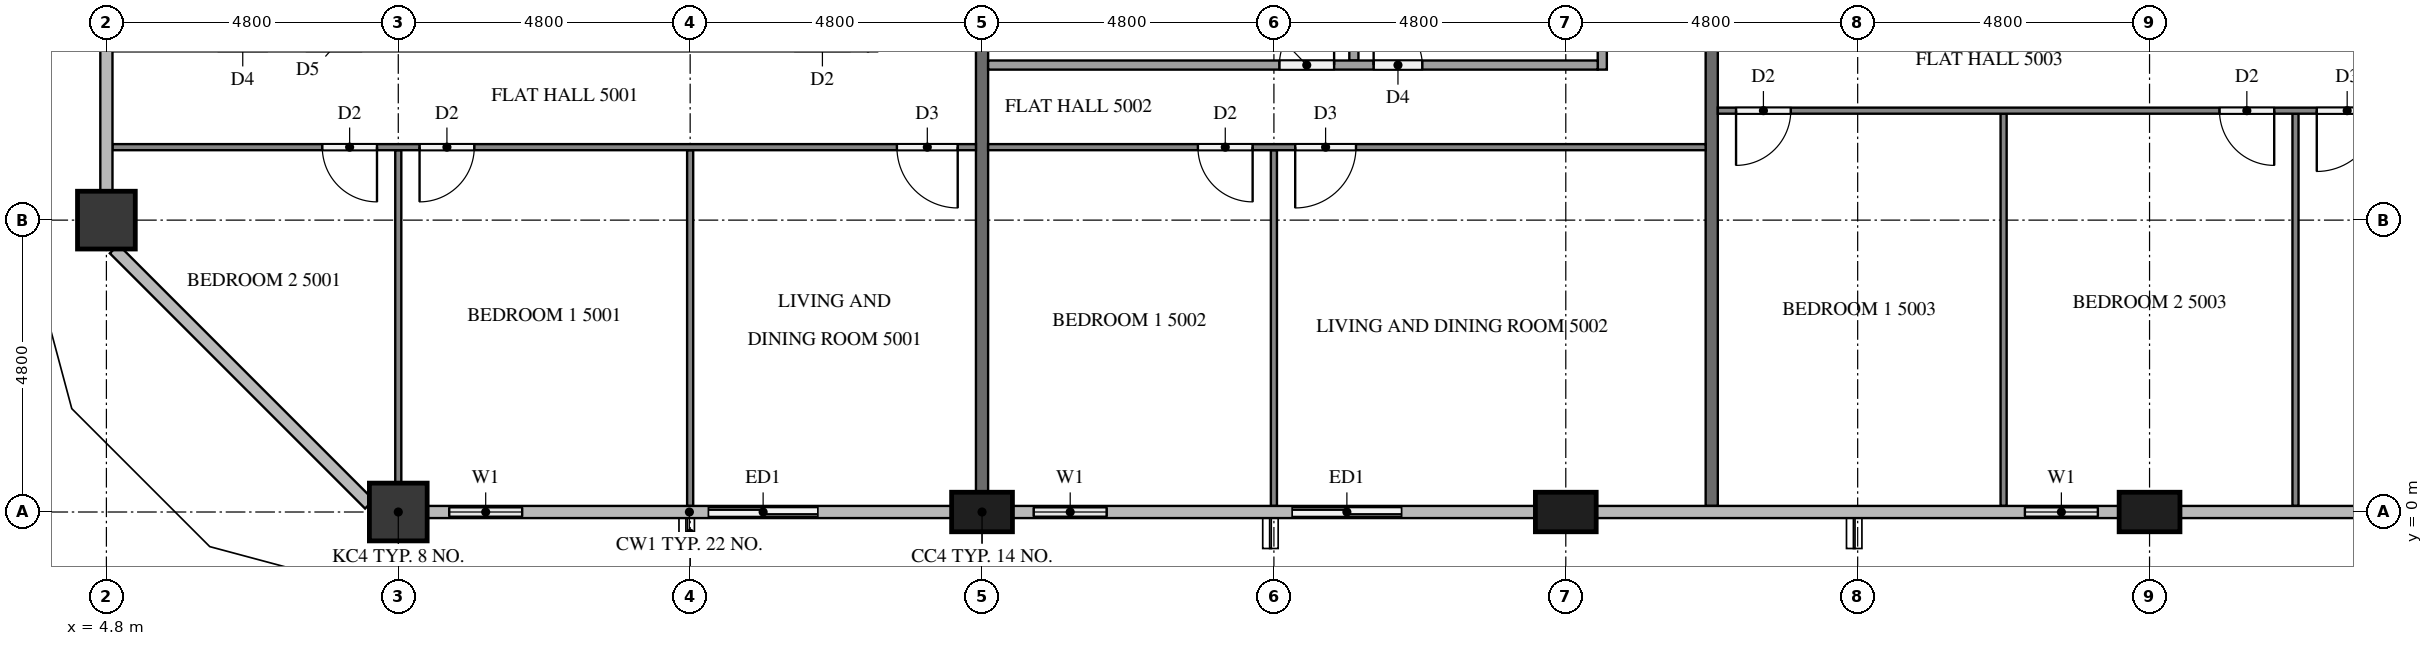
"""IFC4 building model, lengths in metres.
Left out: names, types, materials, properties, quantities, classifications, styles, units other than length and angle.
Written with IfcOpenShell. Run it as: python <this file> out.ifc"""

import sys

from ifc_helpers import new_model, si_unit, direction, frame, frame_2d, origin, origin_2d, place, context, subcontext, project, spatial, rectangle, extrude, element, fill, save


model = new_model("IFC4")
c1 = context("Model", 3, precision=1e-05, world=origin(), true_north=direction((0.0, 1.0)))
c2 = subcontext(c1, "Body", "Model", "MODEL_VIEW")
j1 = project(units=[si_unit("LENGTHUNIT", "METRE"), si_unit("PLANEANGLEUNIT", "RADIAN")], contexts=[c1])
p1 = place(None, origin())
s1 = spatial("IfcSite", under=j1, at=p1, CompositionType="ELEMENT")
p2 = place(p1, origin())
s2 = spatial("IfcBuilding", under=s1, at=p2, CompositionType="ELEMENT")
p3 = place(p2, frame((0.0, 0.0, 192.9)))
s3 = spatial("IfcBuildingStorey", under=s2, at=p3, CompositionType="ELEMENT", Elevation=192.9)
p4 = place(p3, frame((9.6, 0.0, 0.0), z_axis=(0.0, 0.0, 1.0), x_axis=(1.0, 0.0, 0.0)))
e1 = element("IfcColumn", 1, at=p4, inside=s3, PredefinedType="COLUMN", context=c2, shape_type="SweptSolid", body=[
    extrude(rectangle(XDim=0.95, YDim=0.95, at=origin_2d()), origin(), (0.0, 0.0, 1.0), 3.2),
])
for number, where, z_axis, x_axis in (
    (2, (19.2, 0.0, 0.0), (0.0, 0.0, 1.0), (1.0, 0.0, 0.0)),
    (3, (28.8, 0.0, 0.0), (0.0, 0.0, 1.0), (1.0, 0.0, 0.0)),
    (4, (38.4, 0.0, 0.0), (0.0, 0.0, 1.0), (1.0, 0.0, 0.0)),
):
    element("IfcColumn", number, at=place(p3, frame(where, z_axis=z_axis, x_axis=x_axis)), inside=s3, PredefinedType="COLUMN", context=c2, shape_type="SweptSolid", body=[
        extrude(rectangle(XDim=1.0, YDim=0.65, at=origin_2d()), origin(), (0.0, 0.0, 1.0), 3.2),
    ])
p5 = place(p3, frame((4.8, 4.8, 0.0), z_axis=(0.0, 0.0, 1.0), x_axis=(1.0, 0.0, 0.0)))
e5 = element("IfcColumn", 5, at=p5, inside=s3, PredefinedType="COLUMN", context=c2, shape_type="SweptSolid", body=[
    extrude(rectangle(XDim=0.95, YDim=0.95, at=origin_2d()), origin(), (0.0, 0.0, 1.0), 3.2),
])
p6 = place(p3, frame((10.075, 0.0, 0.0), z_axis=(0.0, 0.0, 1.0), x_axis=(1.0, 0.0, 0.0)))
e6 = element("IfcWall", 6, at=p6, inside=s3, PredefinedType="SOLIDWALL", context=c2, shape_type="SweptSolid", body=[
    extrude(rectangle(XDim=1.925, YDim=0.15, at=frame_2d((0.962, 0.0))), origin(), (0.0, 0.0, 1.0), 3.2),
])
p7 = place(p6, frame((0.363, 0.0, 0.9)))
e7 = element("IfcOpeningElement", 7, at=p7, cuts=e6, PredefinedType="OPENING", context=c2, shape_type="SweptSolid", body=[
    extrude(rectangle(XDim=1.2, YDim=1.4, at=frame_2d((0.6, 0.7))), frame((0.0, 0.085, 0.0), z_axis=(0.0, -1.0, 0.0), x_axis=(1.0, 0.0, 0.0)), (0.0, 0.0, 1.0), 0.17),
])
p8 = place(p3, frame((14.4, 0.0, 0.0), z_axis=(0.0, 0.0, 1.0), x_axis=(1.0, 0.0, 0.0)))
e8 = element("IfcWall", 8, at=p8, inside=s3, PredefinedType="SOLIDWALL", context=c2, shape_type="SweptSolid", body=[
    extrude(rectangle(XDim=2.4, YDim=0.15, at=frame_2d((1.2, 0.0))), origin(), (0.0, 0.0, 1.0), 3.2),
])
p9 = place(p8, frame((0.3, 0.0, 0.0)))
e9 = element("IfcOpeningElement", 9, at=p9, cuts=e8, PredefinedType="OPENING", context=c2, shape_type="SweptSolid", body=[
    extrude(rectangle(XDim=1.8, YDim=2.4, at=frame_2d((0.9, 1.2))), frame((0.0, 0.085, 0.0), z_axis=(0.0, -1.0, 0.0), x_axis=(1.0, 0.0, 0.0)), (0.0, 0.0, 1.0), 0.17),
])
p10 = place(p3, frame((19.7, 0.0, 0.0), z_axis=(0.0, 0.0, 1.0), x_axis=(1.0, 0.0, 0.0)))
e10 = element("IfcWall", 10, at=p10, inside=s3, PredefinedType="SOLIDWALL", context=c2, shape_type="SweptSolid", body=[
    extrude(rectangle(XDim=1.9, YDim=0.15, at=frame_2d((0.95, 0.0))), origin(), (0.0, 0.0, 1.0), 3.2),
])
p11 = place(p10, frame((0.35, 0.0, 0.9)))
e11 = element("IfcOpeningElement", 11, at=p11, cuts=e10, PredefinedType="OPENING", context=c2, shape_type="SweptSolid", body=[
    extrude(rectangle(XDim=1.2, YDim=1.4, at=frame_2d((0.6, 0.7))), frame((0.0, 0.085, 0.0), z_axis=(0.0, -1.0, 0.0), x_axis=(1.0, 0.0, 0.0)), (0.0, 0.0, 1.0), 0.17),
])
p12 = place(p3, frame((24.0, 0.0, 0.0), z_axis=(0.0, 0.0, 1.0), x_axis=(1.0, 0.0, 0.0)))
e12 = element("IfcWall", 12, at=p12, inside=s3, PredefinedType="SOLIDWALL", context=c2, shape_type="SweptSolid", body=[
    extrude(rectangle(XDim=2.4, YDim=0.15, at=frame_2d((1.2, 0.0))), origin(), (0.0, 0.0, 1.0), 3.2),
])
p13 = place(p12, frame((0.3, 0.0, 0.0)))
e13 = element("IfcOpeningElement", 13, at=p13, cuts=e12, PredefinedType="OPENING", context=c2, shape_type="SweptSolid", body=[
    extrude(rectangle(XDim=1.8, YDim=2.4, at=frame_2d((0.9, 1.2))), frame((0.0, 0.085, 0.0), z_axis=(0.0, -1.0, 0.0), x_axis=(1.0, 0.0, 0.0)), (0.0, 0.0, 1.0), 0.17),
])
p14 = place(p3, frame((36.0, 0.0, 0.0), z_axis=(0.0, 0.0, 1.0), x_axis=(1.0, 0.0, 0.0)))
e14 = element("IfcWall", 14, at=p14, inside=s3, PredefinedType="SOLIDWALL", context=c2, shape_type="SweptSolid", body=[
    extrude(rectangle(XDim=1.9, YDim=0.15, at=frame_2d((0.95, 0.0))), origin(), (0.0, 0.0, 1.0), 3.2),
])
p15 = place(p14, frame((0.35, 0.0, 0.9)))
e15 = element("IfcOpeningElement", 15, at=p15, cuts=e14, PredefinedType="OPENING", context=c2, shape_type="SweptSolid", body=[
    extrude(rectangle(XDim=1.2, YDim=1.4, at=frame_2d((0.6, 0.7))), frame((0.0, 0.085, 0.0), z_axis=(0.0, -1.0, 0.0), x_axis=(1.0, 0.0, 0.0)), (0.0, 0.0, 1.0), 0.17),
])
p16 = place(p3, frame((19.2, 11.9, 0.0), z_axis=(0.0, 0.0, 1.0), x_axis=(0.0, -1.0, 0.0)))
e16 = element("IfcWall", 16, at=p16, inside=s3, PredefinedType="PARTITIONING", context=c2, shape_type="SweptSolid", body=[
    extrude(rectangle(XDim=11.575, YDim=0.2, at=frame_2d((5.788, 0.0))), origin(), (0.0, 0.0, 1.0), 3.2),
])
p17 = place(p3, frame((31.2, 11.9, 0.0), z_axis=(0.0, 0.0, 1.0), x_axis=(0.0, -1.0, 0.0)))
e17 = element("IfcWall", 17, at=p17, inside=s3, PredefinedType="PARTITIONING", context=c2, shape_type="SweptSolid", body=[
    extrude(rectangle(XDim=11.8, YDim=0.2, at=frame_2d((5.9, 0.0))), origin(), (0.0, 0.0, 1.0), 3.2),
])
p18 = place(p3, frame((14.4, 5.95, 0.0), z_axis=(0.0, 0.0, 1.0), x_axis=(0.0, -1.0, 0.0)))
e18 = element("IfcWall", 18, at=p18, inside=s3, PredefinedType="PARTITIONING", context=c2, shape_type="SweptSolid", body=[
    extrude(rectangle(XDim=5.85, YDim=0.1, at=frame_2d((2.925, 0.0))), origin(), (0.0, 0.0, 1.0), 3.2),
])
p19 = place(p3, frame((9.6, 5.95, 0.0), z_axis=(0.0, 0.0, 1.0), x_axis=(0.0, -1.0, 0.0)))
e19 = element("IfcWall", 19, at=p19, inside=s3, PredefinedType="PARTITIONING", context=c2, shape_type="SweptSolid", body=[
    extrude(rectangle(XDim=5.475, YDim=0.1, at=frame_2d((2.737, 0.0))), origin(), (0.0, 0.0, 1.0), 3.2),
])
p20 = place(p3, frame((19.1, 6.0, 0.0), z_axis=(0.0, 0.0, 1.0), x_axis=(-1.0, 0.0, 0.0)))
e20 = element("IfcWall", 20, at=p20, inside=s3, PredefinedType="PARTITIONING", context=c2, shape_type="SweptSolid", body=[
    extrude(rectangle(XDim=14.2, YDim=0.1, at=frame_2d((7.1, 0.0))), origin(), (0.0, 0.0, 1.0), 3.2),
])
p21 = place(p20, frame((0.3, 0.0, 0.0)))
e21 = element("IfcOpeningElement", 21, at=p21, cuts=e20, PredefinedType="OPENING", context=c2, shape_type="SweptSolid", body=[
    extrude(rectangle(XDim=1.0, YDim=2.1, at=frame_2d((0.5, 1.05))), frame((0.0, 0.06, 0.0), z_axis=(0.0, -1.0, 0.0), x_axis=(1.0, 0.0, 0.0)), (0.0, 0.0, 1.0), 0.12),
])
p22 = place(p20, frame((8.25, 0.0, 0.0)))
e22 = element("IfcOpeningElement", 22, at=p22, cuts=e20, PredefinedType="OPENING", context=c2, shape_type="SweptSolid", body=[
    extrude(rectangle(XDim=0.9, YDim=2.1, at=frame_2d((0.45, 1.05))), frame((0.0, 0.06, 0.0), z_axis=(0.0, -1.0, 0.0), x_axis=(1.0, 0.0, 0.0)), (0.0, 0.0, 1.0), 0.12),
])
p23 = place(p20, frame((9.85, 0.0, 0.0)))
e23 = element("IfcOpeningElement", 23, at=p23, cuts=e20, PredefinedType="OPENING", context=c2, shape_type="SweptSolid", body=[
    extrude(rectangle(XDim=0.9, YDim=2.1, at=frame_2d((0.45, 1.05))), frame((0.0, 0.06, 0.0), z_axis=(0.0, -1.0, 0.0), x_axis=(1.0, 0.0, 0.0)), (0.0, 0.0, 1.0), 0.12),
])
p24 = place(p3, frame((24.0, 5.95, 0.0), z_axis=(0.0, 0.0, 1.0), x_axis=(0.0, -1.0, 0.0)))
e24 = element("IfcWall", 24, at=p24, inside=s3, PredefinedType="PARTITIONING", context=c2, shape_type="SweptSolid", body=[
    extrude(rectangle(XDim=5.85, YDim=0.1, at=frame_2d((2.925, 0.0))), origin(), (0.0, 0.0, 1.0), 3.2),
])
p25 = place(p3, frame((31.1, 6.0, 0.0), z_axis=(0.0, 0.0, 1.0), x_axis=(-1.0, 0.0, 0.0)))
e25 = element("IfcWall", 25, at=p25, inside=s3, PredefinedType="PARTITIONING", context=c2, shape_type="SweptSolid", body=[
    extrude(rectangle(XDim=11.8, YDim=0.1, at=frame_2d((5.9, 0.0))), origin(), (0.0, 0.0, 1.0), 3.2),
])
p26 = place(p25, frame((5.75, 0.0, 0.0)))
e26 = element("IfcOpeningElement", 26, at=p26, cuts=e25, PredefinedType="OPENING", context=c2, shape_type="SweptSolid", body=[
    extrude(rectangle(XDim=1.0, YDim=2.1, at=frame_2d((0.5, 1.05))), frame((0.0, 0.06, 0.0), z_axis=(0.0, -1.0, 0.0), x_axis=(1.0, 0.0, 0.0)), (0.0, 0.0, 1.0), 0.12),
])
p27 = place(p25, frame((7.45, 0.0, 0.0)))
e27 = element("IfcOpeningElement", 27, at=p27, cuts=e25, PredefinedType="OPENING", context=c2, shape_type="SweptSolid", body=[
    extrude(rectangle(XDim=0.9, YDim=2.1, at=frame_2d((0.45, 1.05))), frame((0.0, 0.06, 0.0), z_axis=(0.0, -1.0, 0.0), x_axis=(1.0, 0.0, 0.0)), (0.0, 0.0, 1.0), 0.12),
])
p28 = place(p3, frame((25.315, 11.9, 0.0), z_axis=(0.0, 0.0, 1.0), x_axis=(0.0, -1.0, 0.0)))
e28 = element("IfcWall", 28, at=p28, inside=s3, PredefinedType="PARTITIONING", context=c2, shape_type="SweptSolid", body=[
    extrude(rectangle(XDim=4.475, YDim=0.15, at=frame_2d((2.237, 0.0))), origin(), (0.0, 0.0, 1.0), 3.2),
])
p29 = place(p3, frame((29.4, 11.9, 0.0), z_axis=(0.0, 0.0, 1.0), x_axis=(0.0, -1.0, 0.0)))
e29 = element("IfcWall", 29, at=p29, inside=s3, PredefinedType="PARTITIONING", context=c2, shape_type="SweptSolid", body=[
    extrude(rectangle(XDim=4.625, YDim=0.15, at=frame_2d((2.312, 0.0))), origin(), (0.0, 0.0, 1.0), 3.2),
])
p30 = place(p3, frame((19.3, 7.35, 0.0), z_axis=(0.0, 0.0, 1.0), x_axis=(1.0, 0.0, 0.0)))
e30 = element("IfcWall", 30, at=p30, inside=s3, PredefinedType="PARTITIONING", context=c2, shape_type="SweptSolid", body=[
    extrude(rectangle(XDim=10.025, YDim=0.15, at=frame_2d((5.012, 0.0))), origin(), (0.0, 0.0, 1.0), 3.2),
])
p31 = place(p30, frame((6.34, 0.0, 0.0)))
e31 = element("IfcOpeningElement", 31, at=p31, cuts=e30, PredefinedType="OPENING", context=c2, shape_type="SweptSolid", body=[
    extrude(rectangle(XDim=0.8, YDim=2.1, at=frame_2d((0.4, 1.05))), frame((0.0, 0.085, 0.0), z_axis=(0.0, -1.0, 0.0), x_axis=(1.0, 0.0, 0.0)), (0.0, 0.0, 1.0), 0.17),
])
p32 = place(p30, frame((4.79, 0.0, 0.0)))
e32 = element("IfcOpeningElement", 32, at=p32, cuts=e30, PredefinedType="OPENING", context=c2, shape_type="SweptSolid", body=[
    extrude(rectangle(XDim=0.9, YDim=2.1, at=frame_2d((0.45, 1.05))), frame((0.0, 0.085, 0.0), z_axis=(0.0, -1.0, 0.0), x_axis=(1.0, 0.0, 0.0)), (0.0, 0.0, 1.0), 0.17),
])
for number, where, z_axis, x_axis in (
    (33, (36.0, 6.55, 0.0), (0.0, 0.0, 1.0), (0.0, -1.0, 0.0)),
    (34, (40.8, 6.55, 0.0), (0.0, 0.0, 1.0), (0.0, -1.0, 0.0)),
):
    element("IfcWall", number, at=place(p3, frame(where, z_axis=z_axis, x_axis=x_axis)), inside=s3, PredefinedType="PARTITIONING", context=c2, shape_type="SweptSolid", body=[
        extrude(rectangle(XDim=6.45, YDim=0.1, at=frame_2d((3.225, 0.0))), origin(), (0.0, 0.0, 1.0), 3.2),
    ])
p33 = place(p3, frame((45.5, 6.6, 0.0), z_axis=(0.0, 0.0, 1.0), x_axis=(-1.0, 0.0, 0.0)))
e35 = element("IfcWall", 35, at=p33, inside=s3, PredefinedType="PARTITIONING", context=c2, shape_type="SweptSolid", body=[
    extrude(rectangle(XDim=14.2, YDim=0.1, at=frame_2d((7.1, 0.0))), origin(), (0.0, 0.0, 1.0), 3.2),
])
p34 = place(p33, frame((13.0, 0.0, 0.0)))
e36 = element("IfcOpeningElement", 36, at=p34, cuts=e35, PredefinedType="OPENING", context=c2, shape_type="SweptSolid", body=[
    extrude(rectangle(XDim=0.9, YDim=2.1, at=frame_2d((0.45, 1.05))), frame((0.0, 0.06, 0.0), z_axis=(0.0, -1.0, 0.0), x_axis=(1.0, 0.0, 0.0)), (0.0, 0.0, 1.0), 0.12),
])
p35 = place(p33, frame((5.05, 0.0, 0.0)))
e37 = element("IfcOpeningElement", 37, at=p35, cuts=e35, PredefinedType="OPENING", context=c2, shape_type="SweptSolid", body=[
    extrude(rectangle(XDim=0.9, YDim=2.1, at=frame_2d((0.45, 1.05))), frame((0.0, 0.06, 0.0), z_axis=(0.0, -1.0, 0.0), x_axis=(1.0, 0.0, 0.0)), (0.0, 0.0, 1.0), 0.12),
])
p36 = place(p33, frame((3.35, 0.0, 0.0)))
e38 = element("IfcOpeningElement", 38, at=p36, cuts=e35, PredefinedType="OPENING", context=c2, shape_type="SweptSolid", body=[
    extrude(rectangle(XDim=1.0, YDim=2.1, at=frame_2d((0.5, 1.05))), frame((0.0, 0.06, 0.0), z_axis=(0.0, -1.0, 0.0), x_axis=(1.0, 0.0, 0.0)), (0.0, 0.0, 1.0), 0.12),
])
p37 = place(p7, origin())
e39 = element("IfcWindow", 39, at=p37, inside=s3, PartitioningType="SINGLE_PANEL", PredefinedType="WINDOW", context=c2, shape_type="SweptSolid", body=[
    extrude(rectangle(XDim=1.2, YDim=1.4, at=frame_2d((0.6, 0.7))), frame((0.0, 0.03, 0.0), z_axis=(0.0, -1.0, 0.0), x_axis=(1.0, 0.0, 0.0)), (0.0, 0.0, 1.0), 0.06),
])
fill(e7, e39)
p38 = place(p9, origin())
e40 = element("IfcDoor", 40, at=p38, inside=s3, OperationType="SLIDING_TO_LEFT", PredefinedType="DOOR", context=c2, shape_type="SweptSolid", body=[
    extrude(rectangle(XDim=1.8, YDim=2.4, at=frame_2d((0.9, 1.2))), frame((0.0, 0.025, 0.0), z_axis=(0.0, -1.0, 0.0), x_axis=(1.0, 0.0, 0.0)), (0.0, 0.0, 1.0), 0.05),
])
fill(e9, e40)
p39 = place(p11, origin())
e41 = element("IfcWindow", 41, at=p39, inside=s3, PartitioningType="SINGLE_PANEL", PredefinedType="WINDOW", context=c2, shape_type="SweptSolid", body=[
    extrude(rectangle(XDim=1.2, YDim=1.4, at=frame_2d((0.6, 0.7))), frame((0.0, 0.03, 0.0), z_axis=(0.0, -1.0, 0.0), x_axis=(1.0, 0.0, 0.0)), (0.0, 0.0, 1.0), 0.06),
])
fill(e11, e41)
p40 = place(p13, origin())
e42 = element("IfcDoor", 42, at=p40, inside=s3, OperationType="SLIDING_TO_RIGHT", PredefinedType="DOOR", context=c2, shape_type="SweptSolid", body=[
    extrude(rectangle(XDim=1.8, YDim=2.4, at=frame_2d((0.9, 1.2))), frame((0.0, 0.025, 0.0), z_axis=(0.0, -1.0, 0.0), x_axis=(1.0, 0.0, 0.0)), (0.0, 0.0, 1.0), 0.05),
])
fill(e13, e42)
p41 = place(p15, origin())
e43 = element("IfcWindow", 43, at=p41, inside=s3, PartitioningType="SINGLE_PANEL", PredefinedType="WINDOW", context=c2, shape_type="SweptSolid", body=[
    extrude(rectangle(XDim=1.2, YDim=1.4, at=frame_2d((0.6, 0.7))), frame((0.0, 0.03, 0.0), z_axis=(0.0, -1.0, 0.0), x_axis=(1.0, 0.0, 0.0)), (0.0, 0.0, 1.0), 0.06),
])
fill(e15, e43)
p42 = place(p21, origin())
e44 = element("IfcDoor", 44, at=p42, inside=s3, OperationType="SINGLE_SWING_LEFT", PredefinedType="DOOR", context=c2, shape_type="SweptSolid", body=[
    extrude(rectangle(XDim=1.0, YDim=2.1, at=frame_2d((0.5, 1.05))), frame((0.0, 0.025, 0.0), z_axis=(0.0, -1.0, 0.0), x_axis=(1.0, 0.0, 0.0)), (0.0, 0.0, 1.0), 0.05),
])
fill(e21, e44)
p43 = place(p22, origin())
e45 = element("IfcDoor", 45, at=p43, inside=s3, OperationType="SINGLE_SWING_RIGHT", PredefinedType="DOOR", context=c2, shape_type="SweptSolid", body=[
    extrude(rectangle(XDim=0.9, YDim=2.1, at=frame_2d((0.45, 1.05))), frame((0.0, 0.025, 0.0), z_axis=(0.0, -1.0, 0.0), x_axis=(1.0, 0.0, 0.0)), (0.0, 0.0, 1.0), 0.05),
])
fill(e22, e45)
p44 = place(p23, origin())
e46 = element("IfcDoor", 46, at=p44, inside=s3, OperationType="SINGLE_SWING_LEFT", PredefinedType="DOOR", context=c2, shape_type="SweptSolid", body=[
    extrude(rectangle(XDim=0.9, YDim=2.1, at=frame_2d((0.45, 1.05))), frame((0.0, 0.025, 0.0), z_axis=(0.0, -1.0, 0.0), x_axis=(1.0, 0.0, 0.0)), (0.0, 0.0, 1.0), 0.05),
])
fill(e23, e46)
p45 = place(p26, origin())
e47 = element("IfcDoor", 47, at=p45, inside=s3, OperationType="SINGLE_SWING_RIGHT", PredefinedType="DOOR", context=c2, shape_type="SweptSolid", body=[
    extrude(rectangle(XDim=1.0, YDim=2.1, at=frame_2d((0.5, 1.05))), frame((0.0, 0.025, 0.0), z_axis=(0.0, -1.0, 0.0), x_axis=(1.0, 0.0, 0.0)), (0.0, 0.0, 1.0), 0.05),
])
fill(e26, e47)
p46 = place(p27, origin())
e48 = element("IfcDoor", 48, at=p46, inside=s3, OperationType="SINGLE_SWING_LEFT", PredefinedType="DOOR", context=c2, shape_type="SweptSolid", body=[
    extrude(rectangle(XDim=0.9, YDim=2.1, at=frame_2d((0.45, 1.05))), frame((0.0, 0.025, 0.0), z_axis=(0.0, -1.0, 0.0), x_axis=(1.0, 0.0, 0.0)), (0.0, 0.0, 1.0), 0.05),
])
fill(e27, e48)
p47 = place(p31, origin())
e49 = element("IfcDoor", 49, at=p47, inside=s3, OperationType="SINGLE_SWING_LEFT", PredefinedType="DOOR", context=c2, shape_type="SweptSolid", body=[
    extrude(rectangle(XDim=0.8, YDim=2.1, at=frame_2d((0.4, 1.05))), frame((0.0, 0.025, 0.0), z_axis=(0.0, -1.0, 0.0), x_axis=(1.0, 0.0, 0.0)), (0.0, 0.0, 1.0), 0.05),
])
fill(e31, e49)
p48 = place(p32, origin())
e50 = element("IfcDoor", 50, at=p48, inside=s3, OperationType="SINGLE_SWING_RIGHT", PredefinedType="DOOR", context=c2, shape_type="SweptSolid", body=[
    extrude(rectangle(XDim=0.9, YDim=2.1, at=frame_2d((0.45, 1.05))), frame((0.0, 0.025, 0.0), z_axis=(0.0, -1.0, 0.0), x_axis=(1.0, 0.0, 0.0)), (0.0, 0.0, 1.0), 0.05),
])
fill(e32, e50)
p49 = place(p34, origin())
e51 = element("IfcDoor", 51, at=p49, inside=s3, OperationType="SINGLE_SWING_RIGHT", PredefinedType="DOOR", context=c2, shape_type="SweptSolid", body=[
    extrude(rectangle(XDim=0.9, YDim=2.1, at=frame_2d((0.45, 1.05))), frame((0.0, 0.025, 0.0), z_axis=(0.0, -1.0, 0.0), x_axis=(1.0, 0.0, 0.0)), (0.0, 0.0, 1.0), 0.05),
])
fill(e36, e51)
p50 = place(p35, origin())
e52 = element("IfcDoor", 52, at=p50, inside=s3, OperationType="SINGLE_SWING_LEFT", PredefinedType="DOOR", context=c2, shape_type="SweptSolid", body=[
    extrude(rectangle(XDim=0.9, YDim=2.1, at=frame_2d((0.45, 1.05))), frame((0.0, 0.025, 0.0), z_axis=(0.0, -1.0, 0.0), x_axis=(1.0, 0.0, 0.0)), (0.0, 0.0, 1.0), 0.05),
])
fill(e37, e52)
p51 = place(p36, origin())
e53 = element("IfcDoor", 53, at=p51, inside=s3, OperationType="SINGLE_SWING_RIGHT", PredefinedType="DOOR", context=c2, shape_type="SweptSolid", body=[
    extrude(rectangle(XDim=1.0, YDim=2.1, at=frame_2d((0.5, 1.05))), frame((0.0, 0.025, 0.0), z_axis=(0.0, -1.0, 0.0), x_axis=(1.0, 0.0, 0.0)), (0.0, 0.0, 1.0), 0.05),
])
fill(e38, e53)
save(model, sys.argv[1])
